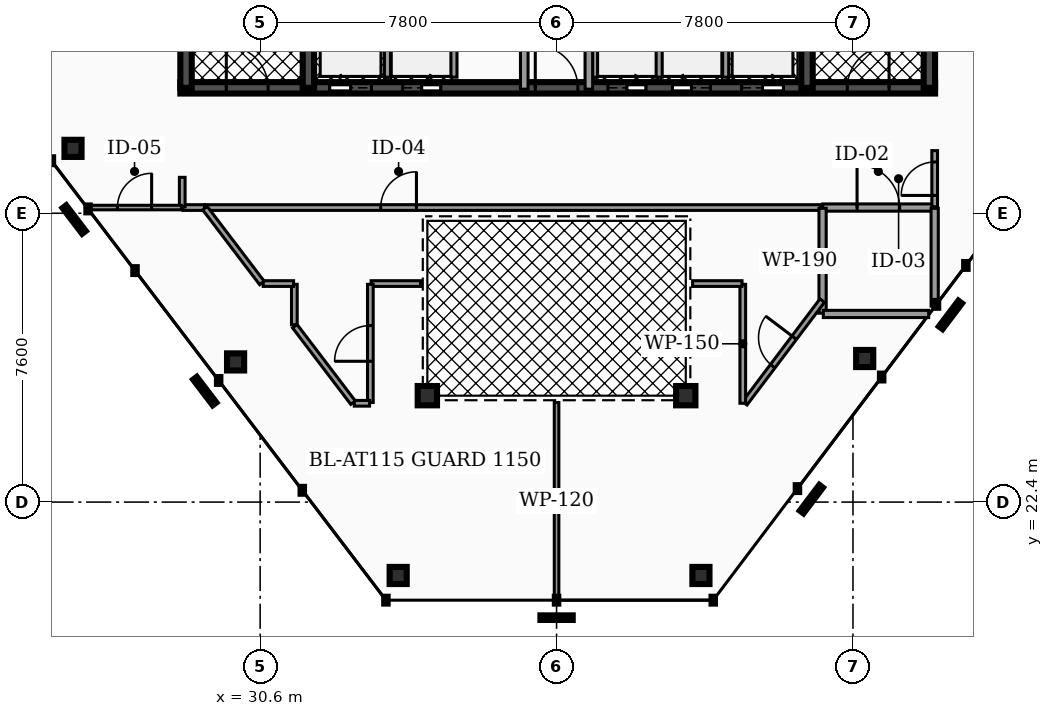
"""IFC4 building model, lengths in metres.
Left out: names, types, materials, properties, quantities, classifications, styles, units other than length and angle.
Written with IfcOpenShell. Run it as: python <this file> out.ifc"""

import sys

from ifc_helpers import new_model, si_unit, direction, frame, frame_2d, origin, origin_2d, place, context, subcontext, project, spatial, rectangle, hollow_rectangle, hollow_circle, extrude, element, fill, save


model = new_model("IFC4")
c1 = context("Model", 3, precision=1e-05, world=origin(), true_north=direction((0.0, 1.0)))
c2 = subcontext(c1, "Body", "Model", "MODEL_VIEW")
j1 = project(units=[si_unit("LENGTHUNIT", "METRE"), si_unit("PLANEANGLEUNIT", "RADIAN")], contexts=[c1])
p1 = place(None, origin())
s1 = spatial("IfcSite", under=j1, at=p1, CompositionType="ELEMENT")
p2 = place(p1, origin())
s2 = spatial("IfcBuilding", under=s1, at=p2, CompositionType="ELEMENT")
p3 = place(p2, frame((0.0, 0.0, 278.8)))
s3 = spatial("IfcBuildingStorey", under=s2, at=p3, CompositionType="ELEMENT", Elevation=278.8)
p4 = place(p3, frame((28.5, 33.3, 0.0), z_axis=(0.0, 0.0, 1.0), x_axis=(1.0, 0.0, 0.0)))
e1 = element("IfcWall", 1, at=p4, inside=s3, PredefinedType="SHEAR", context=c2, shape_type="SweptSolid", body=[
    extrude(rectangle(XDim=19.86, YDim=0.3, at=frame_2d((9.93, 0.0))), origin(), (0.0, 0.0, 1.0), 3.18),
])
p5 = place(p4, frame((3.93, 0.0, 0.0)))
e2 = element("IfcOpeningElement", 2, at=p5, cuts=e1, PredefinedType="OPENING", context=c2, shape_type="SweptSolid", body=[
    extrude(rectangle(XDim=1.1, YDim=2.15, at=frame_2d((0.55, 1.075))), frame((0.0, 0.16, 0.0), z_axis=(0.0, -1.0, 0.0), x_axis=(1.0, 0.0, 0.0)), (0.0, 0.0, 1.0), 0.32),
])
p6 = place(p4, frame((14.77, 0.0, 0.0)))
e3 = element("IfcOpeningElement", 3, at=p6, cuts=e1, PredefinedType="OPENING", context=c2, shape_type="SweptSolid", body=[
    extrude(rectangle(XDim=1.1, YDim=2.15, at=frame_2d((0.55, 1.075))), frame((0.0, 0.16, 0.0), z_axis=(0.0, -1.0, 0.0), x_axis=(1.0, 0.0, 0.0)), (0.0, 0.0, 1.0), 0.32),
])
p7 = place(p4, frame((11.25, 0.0, 0.0)))
e4 = element("IfcOpeningElement", 4, at=p7, cuts=e1, PredefinedType="OPENING", context=c2, shape_type="SweptSolid", body=[
    extrude(rectangle(XDim=1.0, YDim=2.1, at=frame_2d((0.5, 1.05))), frame((0.0, 0.16, 0.0), z_axis=(0.0, -1.0, 0.0), x_axis=(1.0, 0.0, 0.0)), (0.0, 0.0, 1.0), 0.32),
])
p8 = place(p4, frame((12.95, 0.0, 0.0)))
e5 = element("IfcOpeningElement", 5, at=p8, cuts=e1, PredefinedType="OPENING", context=c2, shape_type="SweptSolid", body=[
    extrude(rectangle(XDim=1.0, YDim=2.1, at=frame_2d((0.5, 1.05))), frame((0.0, 0.16, 0.0), z_axis=(0.0, -1.0, 0.0), x_axis=(1.0, 0.0, 0.0)), (0.0, 0.0, 1.0), 0.32),
])
p9 = place(p4, frame((5.85, 0.0, 0.0)))
e6 = element("IfcOpeningElement", 6, at=p9, cuts=e1, PredefinedType="OPENING", context=c2, shape_type="SweptSolid", body=[
    extrude(rectangle(XDim=1.0, YDim=2.1, at=frame_2d((0.5, 1.05))), frame((0.0, 0.16, 0.0), z_axis=(0.0, -1.0, 0.0), x_axis=(1.0, 0.0, 0.0)), (0.0, 0.0, 1.0), 0.32),
])
p10 = place(p4, frame((1.21, 0.0, 0.0)))
e7 = element("IfcOpeningElement", 7, at=p10, cuts=e1, PredefinedType="OPENING", context=c2, shape_type="SweptSolid", body=[
    extrude(rectangle(XDim=1.1, YDim=2.2, at=frame_2d((0.55, 1.1))), frame((0.0, 0.16, 0.0), z_axis=(0.0, -1.0, 0.0), x_axis=(1.0, 0.0, 0.0)), (0.0, 0.0, 1.0), 0.32),
])
p11 = place(p4, frame((9.34, 0.0, 0.0)))
e8 = element("IfcOpeningElement", 8, at=p11, cuts=e1, PredefinedType="OPENING", context=c2, shape_type="SweptSolid", body=[
    extrude(rectangle(XDim=1.12, YDim=2.05, at=frame_2d((0.56, 1.025))), frame((0.0, 0.16, 0.0), z_axis=(0.0, -1.0, 0.0), x_axis=(1.0, 0.0, 0.0)), (0.0, 0.0, 1.0), 0.32),
])
p12 = place(p4, frame((17.55, 0.0, 0.0)))
e9 = element("IfcOpeningElement", 9, at=p12, cuts=e1, PredefinedType="OPENING", context=c2, shape_type="SweptSolid", body=[
    extrude(rectangle(XDim=1.1, YDim=2.2, at=frame_2d((0.55, 1.1))), frame((0.0, 0.16, 0.0), z_axis=(0.0, -1.0, 0.0), x_axis=(1.0, 0.0, 0.0)), (0.0, 0.0, 1.0), 0.32),
])
for number, where, z_axis, x_axis in (
    (10, (28.65, 33.3, 0.0), (0.0, 0.0, 1.0), (0.0, 1.0, 0.0)),
    (11, (31.87, 33.3, 0.0), (0.0, 0.0, 1.0), (0.0, 1.0, 0.0)),
    (12, (44.99, 33.3, 0.0), (0.0, 0.0, 1.0), (0.0, 1.0, 0.0)),
    (13, (48.21, 33.3, 0.0), (0.0, 0.0, 1.0), (0.0, 1.0, 0.0)),
):
    element("IfcWall", number, at=place(p3, frame(where, z_axis=z_axis, x_axis=x_axis)), inside=s3, PredefinedType="SHEAR", context=c2, shape_type="SweptSolid", body=[
        extrude(rectangle(XDim=10.1, YDim=0.3, at=frame_2d((5.05, 0.0))), origin(), (0.0, 0.0, 1.0), 3.18),
    ])
for number, where, z_axis, x_axis in (
    (14, (25.676, 31.708, 0.0), (0.0, 0.0, 1.0), (1.0, 0.0, 0.0)),
    (15, (29.954, 26.088, 0.0), (0.0, 0.0, 1.0), (1.0, 0.0, 0.0)),
    (16, (34.232, 20.469, 0.0), (0.0, 0.0, 1.0), (1.0, 0.0, 0.0)),
    (17, (42.199, 20.469, 0.0), (0.0, 0.0, 1.0), (1.0, 0.0, 0.0)),
    (18, (46.508, 26.178, 0.0), (0.0, 0.0, 1.0), (1.0, 0.0, 0.0)),
):
    element("IfcColumn", number, at=place(p3, frame(where, z_axis=z_axis, x_axis=x_axis)), inside=s3, PredefinedType="COLUMN", context=c2, shape_type="SweptSolid", body=[
        extrude(hollow_rectangle(XDim=0.45, YDim=0.45, WallThickness=0.022, at=origin_2d()), origin(), (0.0, 0.0, 1.0), 3.18),
    ])
for number, where, z_axis, x_axis in (
    (19, (35.0, 25.2, 0.0), (0.0, 0.0, 1.0), (1.0, 0.0, 0.0)),
    (20, (41.8, 25.2, 0.0), (0.0, 0.0, 1.0), (1.0, 0.0, 0.0)),
):
    element("IfcColumn", number, at=place(p3, frame(where, z_axis=z_axis, x_axis=x_axis)), inside=s3, PredefinedType="COLUMN", context=c2, shape_type="SweptSolid", body=[
        extrude(hollow_circle(Radius=0.254, WallThickness=0.02, at=origin_2d()), origin(), (0.0, 0.0, 1.0), 3.18),
    ])
for number, where, z_axis, x_axis in (
    (21, (33.95, 33.58, 0.0), (0.0, 0.0, 1.0), (0.0, 1.0, 0.0)),
    (22, (42.85, 33.58, 0.0), (0.0, 0.0, 1.0), (0.0, 1.0, 0.0)),
):
    element("IfcWall", number, at=place(p3, frame(where, z_axis=z_axis, x_axis=x_axis)), inside=s3, PredefinedType="SOLIDWALL", context=c2, shape_type="SweptSolid", body=[
        extrude(rectangle(XDim=2.45, YDim=0.16, at=frame_2d((1.225, 0.0))), origin(), (0.0, 0.0, 1.0), 3.18),
    ])
for number, where, z_axis, x_axis in (
    (23, (39.4, 33.58, 0.0), (0.0, 0.0, 1.0), (0.0, 1.0, 0.0)),
    (24, (41.1, 33.58, 0.0), (0.0, 0.0, 1.0), (0.0, 1.0, 0.0)),
    (25, (35.7, 33.58, 0.0), (0.0, 0.0, 1.0), (0.0, 1.0, 0.0)),
):
    element("IfcWall", number, at=place(p3, frame(where, z_axis=z_axis, x_axis=x_axis)), inside=s3, PredefinedType="SOLIDWALL", context=c2, shape_type="SweptSolid", body=[
        extrude(rectangle(XDim=2.25, YDim=0.16, at=frame_2d((1.125, 0.0))), origin(), (0.0, 0.0, 1.0), 3.18),
    ])
p13 = place(p3, frame((37.55, 33.265, 0.0), z_axis=(0.0, 0.0, 1.0), x_axis=(0.0, 1.0, 0.0)))
e26 = element("IfcWall", 26, at=p13, inside=s3, PredefinedType="PARTITIONING", context=c2, shape_type="SweptSolid", body=[
    extrude(rectangle(XDim=4.595, YDim=0.2, at=frame_2d((2.298, 0.0))), origin(), (0.0, 0.0, 1.0), 2.235),
])
p14 = place(p13, frame((1.857, 0.0, 0.0)))
e27 = element("IfcOpeningElement", 27, at=p14, cuts=e26, PredefinedType="OPENING", context=c2, shape_type="SweptSolid", body=[
    extrude(rectangle(XDim=0.88, YDim=2.05, at=frame_2d((0.44, 1.025))), frame((0.0, 0.11, 0.0), z_axis=(0.0, -1.0, 0.0), x_axis=(1.0, 0.0, 0.0)), (0.0, 0.0, 1.0), 0.22),
])
p15 = place(p3, frame((39.25, 33.265, 0.0), z_axis=(0.0, 0.0, 1.0), x_axis=(0.0, 1.0, 0.0)))
e28 = element("IfcWall", 28, at=p15, inside=s3, PredefinedType="PARTITIONING", context=c2, shape_type="SweptSolid", body=[
    extrude(rectangle(XDim=4.595, YDim=0.2, at=frame_2d((2.298, 0.0))), origin(), (0.0, 0.0, 1.0), 2.235),
])
p16 = place(p15, frame((3.058, 0.0, 0.0)))
e29 = element("IfcOpeningElement", 29, at=p16, cuts=e28, PredefinedType="OPENING", context=c2, shape_type="SweptSolid", body=[
    extrude(rectangle(XDim=0.88, YDim=2.05, at=frame_2d((0.44, 1.025))), frame((0.0, 0.11, 0.0), z_axis=(0.0, -1.0, 0.0), x_axis=(1.0, 0.0, 0.0)), (0.0, 0.0, 1.0), 0.22),
])
p17 = place(p3, frame((45.405, 30.15, 0.0), z_axis=(0.0, 0.0, 1.0), x_axis=(1.0, 0.0, 0.0)))
e30 = element("IfcWall", 30, at=p17, inside=s3, PredefinedType="PARTITIONING", context=c2, shape_type="SweptSolid", body=[
    extrude(rectangle(XDim=2.925, YDim=0.19, at=frame_2d((1.462, 0.0))), origin(), (0.0, 0.0, 1.0), 2.235),
])
p18 = place(p17, frame((0.903, 0.0, 0.0)))
e31 = element("IfcOpeningElement", 31, at=p18, cuts=e30, PredefinedType="OPENING", context=c2, shape_type="SweptSolid", body=[
    extrude(rectangle(XDim=1.12, YDim=2.05, at=frame_2d((0.56, 1.025))), frame((0.0, 0.105, 0.0), z_axis=(0.0, -1.0, 0.0), x_axis=(1.0, 0.0, 0.0)), (0.0, 0.0, 1.0), 0.21),
])
p19 = place(p3, frame((29.141, 30.15, 0.0), z_axis=(0.0, 0.0, 1.0), x_axis=(1.0, 0.0, 0.0)))
e32 = element("IfcWall", 32, at=p19, inside=s3, PredefinedType="PARTITIONING", context=c2, shape_type="SweptSolid", body=[
    extrude(rectangle(XDim=16.204, YDim=0.15, at=frame_2d((8.102, 0.0))), origin(), (0.0, 0.0, 1.0), 2.235),
])
p20 = place(p19, frame((4.632, 0.0, 0.0)))
e33 = element("IfcOpeningElement", 33, at=p20, cuts=e32, PredefinedType="OPENING", context=c2, shape_type="SweptSolid", body=[
    extrude(rectangle(XDim=0.94, YDim=2.05, at=frame_2d((0.47, 1.025))), frame((0.0, 0.085, 0.0), z_axis=(0.0, -1.0, 0.0), x_axis=(1.0, 0.0, 0.0)), (0.0, 0.0, 1.0), 0.17),
])
p21 = place(p3, frame((28.57, 30.15, 0.0), z_axis=(0.0, 0.0, 1.0), x_axis=(1.0, 0.0, 0.0)))
e34 = element("IfcWall", 34, at=p21, inside=s3, PredefinedType="PARTITIONING", context=c2, shape_type="SweptSolid", body=[
    extrude(rectangle(XDim=0.565, YDim=0.15, at=frame_2d((0.282, 0.0))), origin(), (0.0, 0.0, 1.0), 2.235),
])
p22 = place(p3, frame((48.35, 30.17, 0.0), z_axis=(0.0, 0.0, 1.0), x_axis=(0.0, 1.0, 0.0)))
e35 = element("IfcWall", 35, at=p22, inside=s3, PredefinedType="PARTITIONING", context=c2, shape_type="SweptSolid", body=[
    extrude(rectangle(XDim=1.478, YDim=0.15, at=frame_2d((0.739, 0.0))), origin(), (0.0, 0.0, 1.0), 2.235),
])
p23 = place(p22, frame((0.299, 0.0, 0.0)))
e36 = element("IfcOpeningElement", 36, at=p23, cuts=e35, PredefinedType="OPENING", context=c2, shape_type="SweptSolid", body=[
    extrude(rectangle(XDim=0.88, YDim=2.05, at=frame_2d((0.44, 1.025))), frame((0.0, 0.085, 0.0), z_axis=(0.0, -1.0, 0.0), x_axis=(1.0, 0.0, 0.0)), (0.0, 0.0, 1.0), 0.17),
])
p24 = place(p3, frame((28.55, 30.17, 0.0), z_axis=(0.0, 0.0, 1.0), x_axis=(0.0, 1.0, 0.0)))
e37 = element("IfcWall", 37, at=p24, inside=s3, PredefinedType="PARTITIONING", context=c2, shape_type="SweptSolid", body=[
    extrude(rectangle(XDim=0.775, YDim=0.15, at=frame_2d((0.387, 0.0))), origin(), (0.0, 0.0, 1.0), 2.235),
])
p25 = place(p3, frame((45.4, 27.37, 0.0), z_axis=(0.0, 0.0, 1.0), x_axis=(0.0, 1.0, 0.0)))
e38 = element("IfcWall", 38, at=p25, inside=s3, PredefinedType="PARTITIONING", context=c2, shape_type="SweptSolid", body=[
    extrude(rectangle(XDim=2.76, YDim=0.19, at=frame_2d((1.38, 0.0))), origin(), (0.0, 0.0, 1.0), 2.235),
])
p26 = place(p3, frame((45.42, 27.35, 0.0), z_axis=(0.0, 0.0, 1.0), x_axis=(1.0, 0.0, 0.0)))
e39 = element("IfcWall", 39, at=p26, inside=s3, PredefinedType="PARTITIONING", context=c2, shape_type="SweptSolid", body=[
    extrude(rectangle(XDim=2.772, YDim=0.19, at=frame_2d((1.386, 0.0))), origin(), (0.0, 0.0, 1.0), 2.235),
])
p27 = place(p3, frame((48.35, 27.554, 0.0), z_axis=(0.0, 0.0, 1.0), x_axis=(0.0, 1.0, 0.0)))
e40 = element("IfcWall", 40, at=p27, inside=s3, PredefinedType="PARTITIONING", context=c2, shape_type="SweptSolid", body=[
    extrude(rectangle(XDim=2.575, YDim=0.19, at=frame_2d((1.288, 0.0))), origin(), (0.0, 0.0, 1.0), 2.235),
])
p28 = place(p3, frame((43.351, 25.0, 0.0), z_axis=(0.0, 0.0, 1.0), x_axis=(0.602454578258, 0.798153168969, 0.0)))
e41 = element("IfcWall", 41, at=p28, inside=s3, PredefinedType="PARTITIONING", context=c2, shape_type="SweptSolid", body=[
    extrude(rectangle(XDim=3.386, YDim=0.15, at=frame_2d((1.693, 0.0))), origin(), (0.0, 0.0, 1.0), 2.235),
])
p29 = place(p28, frame((1.223, 0.0, 0.0)))
e42 = element("IfcOpeningElement", 42, at=p29, cuts=e41, PredefinedType="OPENING", context=c2, shape_type="SweptSolid", body=[
    extrude(rectangle(XDim=0.94, YDim=2.05, at=frame_2d((0.47, 1.025))), frame((0.0, 0.085, 0.0), z_axis=(0.0, -1.0, 0.0), x_axis=(1.0, 0.0, 0.0)), (0.0, 0.0, 1.0), 0.17),
])
p30 = place(p3, frame((43.3, 25.0, 0.0), z_axis=(0.0, 0.0, 1.0), x_axis=(0.0, 1.0, 0.0)))
e43 = element("IfcWall", 43, at=p30, inside=s3, PredefinedType="PARTITIONING", context=c2, shape_type="SweptSolid", body=[
    extrude(rectangle(XDim=3.13, YDim=0.15, at=frame_2d((1.565, 0.0))), origin(), (0.0, 0.0, 1.0), 2.235),
])
for number, where, z_axis, x_axis in (
    (44, (41.98, 28.15, 0.0), (0.0, 0.0, 1.0), (1.0, 0.0, 0.0)),
    (45, (33.52, 28.15, 0.0), (0.0, 0.0, 1.0), (1.0, 0.0, 0.0)),
):
    element("IfcWall", number, at=place(p3, frame(where, z_axis=z_axis, x_axis=x_axis)), inside=s3, PredefinedType="PARTITIONING", context=c2, shape_type="SweptSolid", body=[
        extrude(rectangle(XDim=1.3, YDim=0.15, at=frame_2d((0.65, 0.0))), origin(), (0.0, 0.0, 1.0), 2.235),
    ])
p31 = place(p3, frame((33.5, 25.02, 0.0), z_axis=(0.0, 0.0, 1.0), x_axis=(0.0, 1.0, 0.0)))
e46 = element("IfcWall", 46, at=p31, inside=s3, PredefinedType="PARTITIONING", context=c2, shape_type="SweptSolid", body=[
    extrude(rectangle(XDim=3.11, YDim=0.15, at=frame_2d((1.555, 0.0))), origin(), (0.0, 0.0, 1.0), 2.235),
])
p32 = place(p31, frame((1.085, 0.0, 0.0)))
e47 = element("IfcOpeningElement", 47, at=p32, cuts=e46, PredefinedType="OPENING", context=c2, shape_type="SweptSolid", body=[
    extrude(rectangle(XDim=0.94, YDim=2.05, at=frame_2d((0.47, 1.025))), frame((0.0, 0.085, 0.0), z_axis=(0.0, -1.0, 0.0), x_axis=(1.0, 0.0, 0.0)), (0.0, 0.0, 1.0), 0.17),
])
p33 = place(p3, frame((33.077, 25.0, 0.0), z_axis=(0.0, 0.0, 1.0), x_axis=(1.0, 0.0, 0.0)))
e48 = element("IfcWall", 48, at=p33, inside=s3, PredefinedType="PARTITIONING", context=c2, shape_type="SweptSolid", body=[
    extrude(rectangle(XDim=0.403, YDim=0.15, at=frame_2d((0.201, 0.0))), origin(), (0.0, 0.0, 1.0), 2.235),
])
p34 = place(p3, frame((31.512, 27.029, 0.0), z_axis=(0.0, 0.0, 1.0), x_axis=(0.60577285366, -0.795637637225, 0.0)))
e49 = element("IfcWall", 49, at=p34, inside=s3, PredefinedType="PARTITIONING", context=c2, shape_type="SweptSolid", body=[
    extrude(rectangle(XDim=2.531, YDim=0.15, at=frame_2d((1.265, 0.0))), origin(), (0.0, 0.0, 1.0), 2.235),
])
p35 = place(p3, frame((31.5, 27.065, 0.0), z_axis=(0.0, 0.0, 1.0), x_axis=(0.0, 1.0, 0.0)))
e50 = element("IfcWall", 50, at=p35, inside=s3, PredefinedType="PARTITIONING", context=c2, shape_type="SweptSolid", body=[
    extrude(rectangle(XDim=1.065, YDim=0.15, at=frame_2d((0.532, 0.0))), origin(), (0.0, 0.0, 1.0), 2.235),
])
p36 = place(p3, frame((30.679, 28.15, 0.0), z_axis=(0.0, 0.0, 1.0), x_axis=(1.0, 0.0, 0.0)))
e51 = element("IfcWall", 51, at=p36, inside=s3, PredefinedType="PARTITIONING", context=c2, shape_type="SweptSolid", body=[
    extrude(rectangle(XDim=0.801, YDim=0.15, at=frame_2d((0.4, 0.0))), origin(), (0.0, 0.0, 1.0), 2.235),
])
p37 = place(p3, frame((29.148, 30.134, 0.0), z_axis=(0.0, 0.0, 1.0), x_axis=(0.605873710815, -0.795560837739, 0.0)))
e52 = element("IfcWall", 52, at=p37, inside=s3, PredefinedType="PARTITIONING", context=c2, shape_type="SweptSolid", body=[
    extrude(rectangle(XDim=2.474, YDim=0.15, at=frame_2d((1.237, 0.0))), origin(), (0.0, 0.0, 1.0), 2.235),
])
p38 = place(p3, frame((38.4, 19.834, 0.0), z_axis=(0.0, 0.0, 1.0), x_axis=(0.0, 1.0, 0.0)))
e53 = element("IfcWall", 53, at=p38, inside=s3, PredefinedType="PARTITIONING", context=c2, shape_type="SweptSolid", body=[
    extrude(rectangle(XDim=5.186, YDim=0.12, at=frame_2d((2.593, 0.0))), origin(), (0.0, 0.0, 1.0), 2.235),
])
p39 = place(p3, frame((26.059, 30.15, 0.0), z_axis=(0.0, 0.0, 1.0), x_axis=(1.0, 0.0, 0.0)))
e54 = element("IfcWall", 54, at=p39, inside=s3, PredefinedType="PARTITIONING", context=c2, shape_type="SweptSolid", body=[
    extrude(rectangle(XDim=2.471, YDim=0.12, at=frame_2d((1.235, 0.0))), origin(), (0.0, 0.0, 1.0), 2.235),
])
p40 = place(p39, frame((0.785, 0.0, 0.0)))
e55 = element("IfcOpeningElement", 55, at=p40, cuts=e54, PredefinedType="OPENING", context=c2, shape_type="SweptSolid", body=[
    extrude(rectangle(XDim=0.9, YDim=2.05, at=frame_2d((0.45, 1.025))), frame((0.0, 0.07, 0.0), z_axis=(0.0, -1.0, 0.0), x_axis=(1.0, 0.0, 0.0)), (0.0, 0.0, 1.0), 0.14),
])
p41 = place(p5, origin())
e56 = element("IfcDoor", 56, at=p41, inside=s3, OperationType="SLIDING_TO_LEFT", PredefinedType="DOOR", context=c2, shape_type="SweptSolid", body=[
    extrude(rectangle(XDim=1.1, YDim=2.15, at=frame_2d((0.55, 1.075))), frame((0.0, 0.025, 0.0), z_axis=(0.0, -1.0, 0.0), x_axis=(1.0, 0.0, 0.0)), (0.0, 0.0, 1.0), 0.05),
])
fill(e2, e56)
p42 = place(p6, origin())
e57 = element("IfcDoor", 57, at=p42, inside=s3, OperationType="SLIDING_TO_RIGHT", PredefinedType="DOOR", context=c2, shape_type="SweptSolid", body=[
    extrude(rectangle(XDim=1.1, YDim=2.15, at=frame_2d((0.55, 1.075))), frame((0.0, 0.025, 0.0), z_axis=(0.0, -1.0, 0.0), x_axis=(1.0, 0.0, 0.0)), (0.0, 0.0, 1.0), 0.05),
])
fill(e3, e57)
p43 = place(p7, origin())
e58 = element("IfcDoor", 58, at=p43, inside=s3, OperationType="SLIDING_TO_RIGHT", PredefinedType="DOOR", context=c2, shape_type="SweptSolid", body=[
    extrude(rectangle(XDim=1.0, YDim=2.1, at=frame_2d((0.5, 1.05))), frame((0.0, 0.025, 0.0), z_axis=(0.0, -1.0, 0.0), x_axis=(1.0, 0.0, 0.0)), (0.0, 0.0, 1.0), 0.05),
])
fill(e4, e58)
p44 = place(p8, origin())
e59 = element("IfcDoor", 59, at=p44, inside=s3, OperationType="SLIDING_TO_LEFT", PredefinedType="DOOR", context=c2, shape_type="SweptSolid", body=[
    extrude(rectangle(XDim=1.0, YDim=2.1, at=frame_2d((0.5, 1.05))), frame((0.0, 0.025, 0.0), z_axis=(0.0, -1.0, 0.0), x_axis=(1.0, 0.0, 0.0)), (0.0, 0.0, 1.0), 0.05),
])
fill(e5, e59)
p45 = place(p9, origin())
e60 = element("IfcDoor", 60, at=p45, inside=s3, OperationType="SLIDING_TO_RIGHT", PredefinedType="DOOR", context=c2, shape_type="SweptSolid", body=[
    extrude(rectangle(XDim=1.0, YDim=2.1, at=frame_2d((0.5, 1.05))), frame((0.0, 0.025, 0.0), z_axis=(0.0, -1.0, 0.0), x_axis=(1.0, 0.0, 0.0)), (0.0, 0.0, 1.0), 0.05),
])
fill(e6, e60)
p46 = place(p10, origin())
e61 = element("IfcDoor", 61, at=p46, inside=s3, OperationType="SINGLE_SWING_LEFT", PredefinedType="DOOR", context=c2, shape_type="SweptSolid", body=[
    extrude(rectangle(XDim=1.1, YDim=2.2, at=frame_2d((0.55, 1.1))), frame((0.0, 0.025, 0.0), z_axis=(0.0, -1.0, 0.0), x_axis=(1.0, 0.0, 0.0)), (0.0, 0.0, 1.0), 0.05),
])
fill(e7, e61)
p47 = place(p11, origin())
e62 = element("IfcDoor", 62, at=p47, inside=s3, OperationType="SINGLE_SWING_LEFT", PredefinedType="DOOR", context=c2, shape_type="SweptSolid", body=[
    extrude(rectangle(XDim=1.12, YDim=2.05, at=frame_2d((0.56, 1.025))), frame((0.0, 0.025, 0.0), z_axis=(0.0, -1.0, 0.0), x_axis=(1.0, 0.0, 0.0)), (0.0, 0.0, 1.0), 0.05),
])
fill(e8, e62)
p48 = place(p12, origin())
e63 = element("IfcDoor", 63, at=p48, inside=s3, OperationType="SINGLE_SWING_RIGHT", PredefinedType="DOOR", context=c2, shape_type="SweptSolid", body=[
    extrude(rectangle(XDim=1.1, YDim=2.2, at=frame_2d((0.55, 1.1))), frame((0.0, 0.025, 0.0), z_axis=(0.0, -1.0, 0.0), x_axis=(1.0, 0.0, 0.0)), (0.0, 0.0, 1.0), 0.05),
])
fill(e9, e63)
p49 = place(p18, origin())
e64 = element("IfcDoor", 64, at=p49, inside=s3, OperationType="SINGLE_SWING_LEFT", PredefinedType="DOOR", context=c2, shape_type="SweptSolid", body=[
    extrude(rectangle(XDim=1.12, YDim=2.05, at=frame_2d((0.56, 1.025))), frame((0.0, 0.025, 0.0), z_axis=(0.0, -1.0, 0.0), x_axis=(1.0, 0.0, 0.0)), (0.0, 0.0, 1.0), 0.05),
])
fill(e31, e64)
p50 = place(p20, origin())
e65 = element("IfcDoor", 65, at=p50, inside=s3, OperationType="SINGLE_SWING_RIGHT", PredefinedType="DOOR", context=c2, shape_type="SweptSolid", body=[
    extrude(rectangle(XDim=0.94, YDim=2.05, at=frame_2d((0.47, 1.025))), frame((0.0, 0.025, 0.0), z_axis=(0.0, -1.0, 0.0), x_axis=(1.0, 0.0, 0.0)), (0.0, 0.0, 1.0), 0.05),
])
fill(e33, e65)
p51 = place(p23, origin())
e66 = element("IfcDoor", 66, at=p51, inside=s3, OperationType="SINGLE_SWING_LEFT", PredefinedType="DOOR", context=c2, shape_type="SweptSolid", body=[
    extrude(rectangle(XDim=0.88, YDim=2.05, at=frame_2d((0.44, 1.025))), frame((0.0, 0.025, 0.0), z_axis=(0.0, -1.0, 0.0), x_axis=(1.0, 0.0, 0.0)), (0.0, 0.0, 1.0), 0.05),
])
fill(e36, e66)
p52 = place(p29, origin())
e67 = element("IfcDoor", 67, at=p52, inside=s3, OperationType="SINGLE_SWING_RIGHT", PredefinedType="DOOR", context=c2, shape_type="SweptSolid", body=[
    extrude(rectangle(XDim=0.94, YDim=2.05, at=frame_2d((0.47, 1.025))), frame((0.0, 0.025, 0.0), z_axis=(0.0, -1.0, 0.0), x_axis=(1.0, 0.0, 0.0)), (0.0, 0.0, 1.0), 0.05),
])
fill(e42, e67)
p53 = place(p32, origin())
e68 = element("IfcDoor", 68, at=p53, inside=s3, OperationType="SINGLE_SWING_LEFT", PredefinedType="DOOR", context=c2, shape_type="SweptSolid", body=[
    extrude(rectangle(XDim=0.94, YDim=2.05, at=frame_2d((0.47, 1.025))), frame((0.0, 0.025, 0.0), z_axis=(0.0, -1.0, 0.0), x_axis=(1.0, 0.0, 0.0)), (0.0, 0.0, 1.0), 0.05),
])
fill(e47, e68)
p54 = place(p40, origin())
e69 = element("IfcDoor", 69, at=p54, inside=s3, OperationType="SINGLE_SWING_RIGHT", PredefinedType="DOOR", context=c2, shape_type="SweptSolid", body=[
    extrude(rectangle(XDim=0.9, YDim=2.05, at=frame_2d((0.45, 1.025))), frame((0.0, 0.025, 0.0), z_axis=(0.0, -1.0, 0.0), x_axis=(1.0, 0.0, 0.0)), (0.0, 0.0, 1.0), 0.05),
])
fill(e55, e69)
save(model, sys.argv[1])
